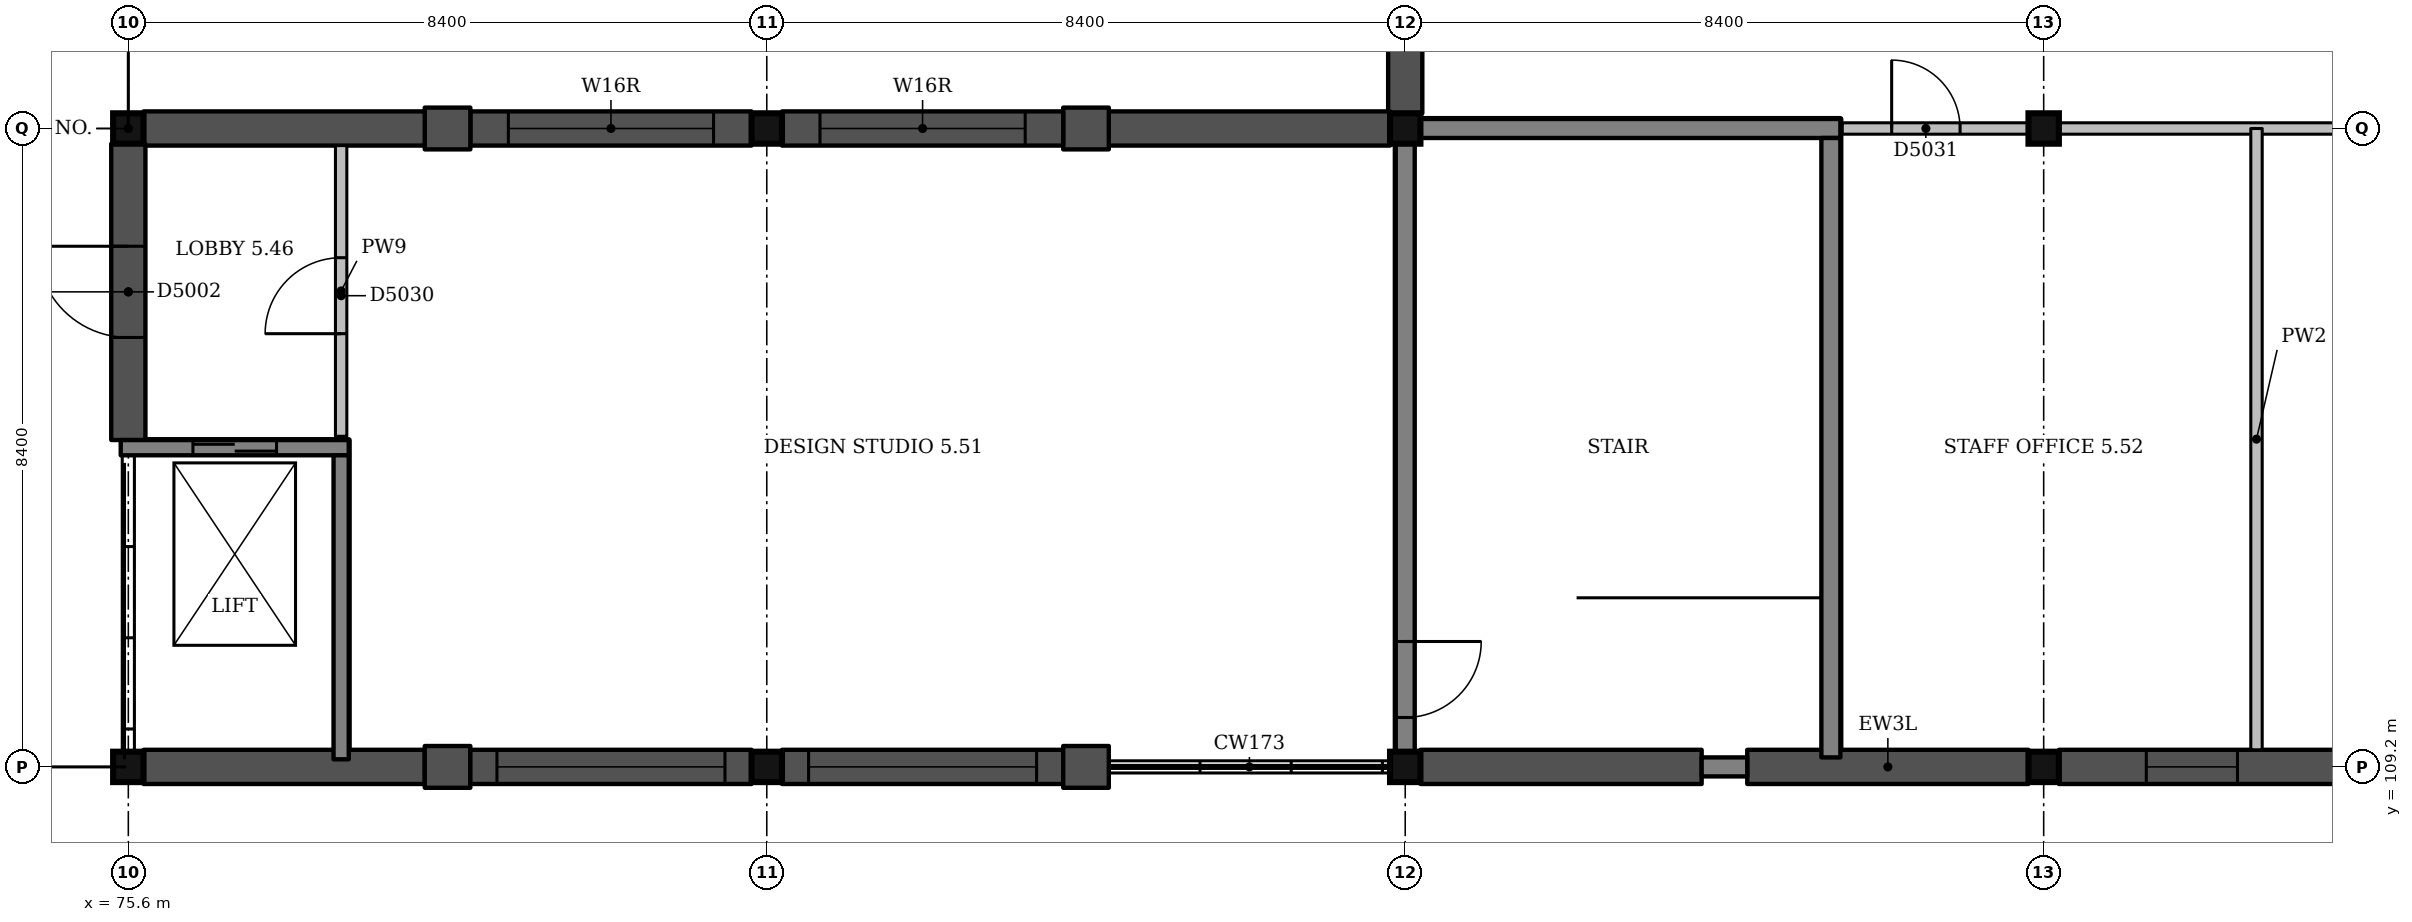
"""IFC4 building model, lengths in metres.
Left out: names, types, materials, properties, quantities, classifications, styles, units other than length and angle.
Written with IfcOpenShell. Run it as: python <this file> out.ifc"""

import sys

from ifc_helpers import new_model, si_unit, direction, frame, frame_2d, origin, origin_2d, place, context, subcontext, project, spatial, rectangle, extrude, element, fill, save


model = new_model("IFC4")
c1 = context("Model", 3, precision=1e-05, world=origin(), true_north=direction((0.0, 1.0)))
c2 = subcontext(c1, "Body", "Model", "MODEL_VIEW")
j1 = project(units=[si_unit("LENGTHUNIT", "METRE"), si_unit("PLANEANGLEUNIT", "RADIAN")], contexts=[c1])
p1 = place(None, origin())
s1 = spatial("IfcSite", under=j1, at=p1, CompositionType="ELEMENT")
p2 = place(p1, origin())
s2 = spatial("IfcBuilding", under=s1, at=p2, CompositionType="ELEMENT")
p3 = place(p2, frame((0.0, 0.0, 22.5)))
s3 = spatial("IfcBuildingStorey", under=s2, at=p3, CompositionType="ELEMENT", Elevation=22.5)
for number, where, z_axis, x_axis in (
    (1, (75.6, 109.2, 0.0), (0.0, 0.0, 1.0), (1.0, 0.0, 0.0)),
    (2, (75.6, 117.6, 0.0), (0.0, 0.0, 1.0), (1.0, 0.0, 0.0)),
    (3, (84.0, 109.2, 0.0), (0.0, 0.0, 1.0), (1.0, 0.0, 0.0)),
    (4, (84.0, 117.6, 0.0), (0.0, 0.0, 1.0), (1.0, 0.0, 0.0)),
    (5, (92.4, 109.2, 0.0), (0.0, 0.0, 1.0), (1.0, 0.0, 0.0)),
    (6, (92.4, 117.6, 0.0), (0.0, 0.0, 1.0), (1.0, 0.0, 0.0)),
    (7, (100.8, 109.2, 0.0), (0.0, 0.0, 1.0), (1.0, 0.0, 0.0)),
    (8, (100.8, 117.6, 0.0), (0.0, 0.0, 1.0), (1.0, 0.0, 0.0)),
):
    element("IfcColumn", number, at=place(p3, frame(where, z_axis=z_axis, x_axis=x_axis)), inside=s3, PredefinedType="COLUMN", context=c2, shape_type="SweptSolid", body=[
        extrude(rectangle(XDim=0.4, YDim=0.4, at=origin_2d()), origin(), (0.0, 0.0, 1.0), 4.5),
    ])
p4 = place(p3, frame((75.5, 113.4, 0.0), z_axis=(0.0, 0.0, 1.0), x_axis=(1.0, 0.0, 0.0)))
e9 = element("IfcWall", 9, at=p4, inside=s3, PredefinedType="SHEAR", context=c2, shape_type="SweptSolid", body=[
    extrude(rectangle(XDim=3.0, YDim=0.2, at=frame_2d((1.5, 0.0))), origin(), (0.0, 0.0, 1.0), 4.5),
])
p5 = place(p4, frame((0.95, 0.0, 0.0)))
e10 = element("IfcOpeningElement", 10, at=p5, cuts=e9, PredefinedType="OPENING", context=c2, shape_type="SweptSolid", body=[
    extrude(rectangle(XDim=1.1, YDim=2.1, at=frame_2d((0.55, 1.05))), frame((0.0, 0.11, 0.0), z_axis=(0.0, -1.0, 0.0), x_axis=(1.0, 0.0, 0.0)), (0.0, 0.0, 1.0), 0.22),
])
p6 = place(p3, frame((78.4, 109.3, 0.0), z_axis=(0.0, 0.0, 1.0), x_axis=(0.0, 1.0, 0.0)))
e11 = element("IfcWall", 11, at=p6, inside=s3, PredefinedType="SHEAR", context=c2, shape_type="SweptSolid", body=[
    extrude(rectangle(XDim=4.0, YDim=0.2, at=frame_2d((2.0, 0.0))), origin(), (0.0, 0.0, 1.0), 4.5),
])
p7 = place(p3, frame((92.6, 117.6, 0.0), z_axis=(0.0, 0.0, 1.0), x_axis=(1.0, 0.0, 0.0)))
e12 = element("IfcWall", 12, at=p7, inside=s3, PredefinedType="SHEAR", context=c2, shape_type="SweptSolid", body=[
    extrude(rectangle(XDim=5.525, YDim=0.25, at=frame_2d((2.762, 0.0))), origin(), (0.0, 0.0, 1.0), 4.2),
])
p8 = place(p3, frame((92.4, 109.4, 0.0), z_axis=(0.0, 0.0, 1.0), x_axis=(0.0, 1.0, 0.0)))
e13 = element("IfcWall", 13, at=p8, inside=s3, PredefinedType="SHEAR", context=c2, shape_type="SweptSolid", body=[
    extrude(rectangle(XDim=8.0, YDim=0.25, at=frame_2d((4.0, 0.0))), origin(), (0.0, 0.0, 1.0), 4.2),
])
p9 = place(p8, frame((0.45, 0.0, 0.0)))
e14 = element("IfcOpeningElement", 14, at=p9, cuts=e13, PredefinedType="OPENING", context=c2, shape_type="SweptSolid", body=[
    extrude(rectangle(XDim=1.0, YDim=2.1, at=frame_2d((0.5, 1.05))), frame((0.0, 0.135, 0.0), z_axis=(0.0, -1.0, 0.0), x_axis=(1.0, 0.0, 0.0)), (0.0, 0.0, 1.0), 0.27),
])
p10 = place(p3, frame((98.0, 109.325, 0.0), z_axis=(0.0, 0.0, 1.0), x_axis=(0.0, 1.0, 0.0)))
e15 = element("IfcWall", 15, at=p10, inside=s3, PredefinedType="SHEAR", context=c2, shape_type="SweptSolid", body=[
    extrude(rectangle(XDim=8.15, YDim=0.25, at=frame_2d((4.075, 0.0))), origin(), (0.0, 0.0, 1.0), 4.2),
])
for number, where, z_axis, x_axis in (
    (16, (92.4, 121.5, 0.0), (0.0, 0.0, 1.0), (0.0, -1.0, 0.0)),
    (17, (92.2, 117.6, 0.0), (0.0, 0.0, 1.0), (-1.0, 0.0, 0.0)),
):
    element("IfcWall", number, at=place(p3, frame(where, z_axis=z_axis, x_axis=x_axis)), inside=s3, PredefinedType="SOLIDWALL", context=c2, shape_type="SweptSolid", body=[
        extrude(rectangle(XDim=3.7, YDim=0.45, at=frame_2d((1.85, 0.0))), origin(), (0.0, 0.0, 1.0), 3.6),
    ])
p11 = place(p3, frame((88.5, 117.6, 0.0), z_axis=(0.0, 0.0, 1.0), x_axis=(-1.0, 0.0, 0.0)))
e18 = element("IfcWall", 18, at=p11, inside=s3, PredefinedType="SOLIDWALL", context=c2, shape_type="SweptSolid", body=[
    extrude(rectangle(XDim=0.6, YDim=0.55, at=frame_2d((0.3, 0.0))), origin(), (0.0, 0.0, 1.0), 3.6),
])
p12 = place(p3, frame((87.9, 117.6, 0.0), z_axis=(0.0, 0.0, 1.0), x_axis=(-1.0, 0.0, 0.0)))
e19 = element("IfcWall", 19, at=p12, inside=s3, PredefinedType="SOLIDWALL", context=c2, shape_type="SweptSolid", body=[
    extrude(rectangle(XDim=3.7, YDim=0.45, at=frame_2d((1.85, 0.0))), origin(), (0.0, 0.0, 1.0), 3.6),
])
p13 = place(p12, frame((0.5, 0.0, 0.6)))
e20 = element("IfcOpeningElement", 20, at=p13, cuts=e19, PredefinedType="OPENING", context=c2, shape_type="SweptSolid", body=[
    extrude(rectangle(XDim=2.7, YDim=2.4, at=frame_2d((1.35, 1.2))), frame((0.0, 0.235, 0.0), z_axis=(0.0, -1.0, 0.0), x_axis=(1.0, 0.0, 0.0)), (0.0, 0.0, 1.0), 0.47),
])
p14 = place(p3, frame((83.8, 117.6, 0.0), z_axis=(0.0, 0.0, 1.0), x_axis=(-1.0, 0.0, 0.0)))
e21 = element("IfcWall", 21, at=p14, inside=s3, PredefinedType="SOLIDWALL", context=c2, shape_type="SweptSolid", body=[
    extrude(rectangle(XDim=3.7, YDim=0.45, at=frame_2d((1.85, 0.0))), origin(), (0.0, 0.0, 1.0), 3.6),
])
p15 = place(p14, frame((0.5, 0.0, 0.6)))
e22 = element("IfcOpeningElement", 22, at=p15, cuts=e21, PredefinedType="OPENING", context=c2, shape_type="SweptSolid", body=[
    extrude(rectangle(XDim=2.7, YDim=2.4, at=frame_2d((1.35, 1.2))), frame((0.0, 0.235, 0.0), z_axis=(0.0, -1.0, 0.0), x_axis=(1.0, 0.0, 0.0)), (0.0, 0.0, 1.0), 0.47),
])
p16 = place(p3, frame((80.1, 117.6, 0.0), z_axis=(0.0, 0.0, 1.0), x_axis=(-1.0, 0.0, 0.0)))
e23 = element("IfcWall", 23, at=p16, inside=s3, PredefinedType="SOLIDWALL", context=c2, shape_type="SweptSolid", body=[
    extrude(rectangle(XDim=0.6, YDim=0.55, at=frame_2d((0.3, 0.0))), origin(), (0.0, 0.0, 1.0), 3.6),
])
p17 = place(p3, frame((79.5, 117.6, 0.0), z_axis=(0.0, 0.0, 1.0), x_axis=(-1.0, 0.0, 0.0)))
e24 = element("IfcWall", 24, at=p17, inside=s3, PredefinedType="SOLIDWALL", context=c2, shape_type="SweptSolid", body=[
    extrude(rectangle(XDim=3.7, YDim=0.45, at=frame_2d((1.85, 0.0))), origin(), (0.0, 0.0, 1.0), 3.6),
])
p18 = place(p3, frame((75.6, 117.4, 0.0), z_axis=(0.0, 0.0, 1.0), x_axis=(0.0, -1.0, 0.0)))
e25 = element("IfcWall", 25, at=p18, inside=s3, PredefinedType="SOLIDWALL", context=c2, shape_type="SweptSolid", body=[
    extrude(rectangle(XDim=3.899, YDim=0.45, at=frame_2d((1.949, 0.0))), origin(), (0.0, 0.0, 1.0), 3.6),
])
p19 = place(p18, frame((1.35, 0.0, 0.0)))
e26 = element("IfcOpeningElement", 26, at=p19, cuts=e25, PredefinedType="OPENING", context=c2, shape_type="SweptSolid", body=[
    extrude(rectangle(XDim=1.2, YDim=2.1, at=frame_2d((0.6, 1.05))), frame((0.0, 0.235, 0.0), z_axis=(0.0, -1.0, 0.0), x_axis=(1.0, 0.0, 0.0)), (0.0, 0.0, 1.0), 0.47),
])
p20 = place(p3, frame((75.8, 109.2, 0.0), z_axis=(0.0, 0.0, 1.0), x_axis=(1.0, 0.0, 0.0)))
e27 = element("IfcWall", 27, at=p20, inside=s3, PredefinedType="SOLIDWALL", context=c2, shape_type="SweptSolid", body=[
    extrude(rectangle(XDim=3.7, YDim=0.45, at=frame_2d((1.85, 0.0))), origin(), (0.0, 0.0, 1.0), 3.6),
])
p21 = place(p3, frame((79.5, 109.2, 0.0), z_axis=(0.0, 0.0, 1.0), x_axis=(1.0, 0.0, 0.0)))
e28 = element("IfcWall", 28, at=p21, inside=s3, PredefinedType="SOLIDWALL", context=c2, shape_type="SweptSolid", body=[
    extrude(rectangle(XDim=0.6, YDim=0.55, at=frame_2d((0.3, 0.0))), origin(), (0.0, 0.0, 1.0), 3.6),
])
p22 = place(p3, frame((80.1, 109.2, 0.0), z_axis=(0.0, 0.0, 1.0), x_axis=(1.0, 0.0, 0.0)))
e29 = element("IfcWall", 29, at=p22, inside=s3, PredefinedType="SOLIDWALL", context=c2, shape_type="SweptSolid", body=[
    extrude(rectangle(XDim=3.7, YDim=0.45, at=frame_2d((1.85, 0.0))), origin(), (0.0, 0.0, 1.0), 3.6),
])
p23 = place(p22, frame((0.35, 0.0, 0.9)))
e30 = element("IfcOpeningElement", 30, at=p23, cuts=e29, PredefinedType="OPENING", context=c2, shape_type="SweptSolid", body=[
    extrude(rectangle(XDim=3.0, YDim=2.1, at=frame_2d((1.5, 1.05))), frame((0.0, 0.235, 0.0), z_axis=(0.0, -1.0, 0.0), x_axis=(1.0, 0.0, 0.0)), (0.0, 0.0, 1.0), 0.47),
])
p24 = place(p3, frame((84.2, 109.2, 0.0), z_axis=(0.0, 0.0, 1.0), x_axis=(1.0, 0.0, 0.0)))
e31 = element("IfcWall", 31, at=p24, inside=s3, PredefinedType="SOLIDWALL", context=c2, shape_type="SweptSolid", body=[
    extrude(rectangle(XDim=3.7, YDim=0.45, at=frame_2d((1.85, 0.0))), origin(), (0.0, 0.0, 1.0), 4.2),
])
p25 = place(p24, frame((0.35, 0.0, 0.9)))
e32 = element("IfcOpeningElement", 32, at=p25, cuts=e31, PredefinedType="OPENING", context=c2, shape_type="SweptSolid", body=[
    extrude(rectangle(XDim=3.0, YDim=2.1, at=frame_2d((1.5, 1.05))), frame((0.0, 0.235, 0.0), z_axis=(0.0, -1.0, 0.0), x_axis=(1.0, 0.0, 0.0)), (0.0, 0.0, 1.0), 0.47),
])
p26 = place(p3, frame((87.9, 109.2, 0.0), z_axis=(0.0, 0.0, 1.0), x_axis=(1.0, 0.0, 0.0)))
e33 = element("IfcWall", 33, at=p26, inside=s3, PredefinedType="SOLIDWALL", context=c2, shape_type="SweptSolid", body=[
    extrude(rectangle(XDim=0.6, YDim=0.55, at=frame_2d((0.3, 0.0))), origin(), (0.0, 0.0, 1.0), 4.2),
])
p27 = place(p3, frame((92.6, 109.2, 0.0), z_axis=(0.0, 0.0, 1.0), x_axis=(1.0, 0.0, 0.0)))
e34 = element("IfcWall", 34, at=p27, inside=s3, PredefinedType="SOLIDWALL", context=c2, shape_type="SweptSolid", body=[
    extrude(rectangle(XDim=3.7, YDim=0.45, at=frame_2d((1.85, 0.0))), origin(), (0.0, 0.0, 1.0), 3.6),
])
p28 = place(p3, frame((96.9, 109.2, 0.0), z_axis=(0.0, 0.0, 1.0), x_axis=(1.0, 0.0, 0.0)))
e35 = element("IfcWall", 35, at=p28, inside=s3, PredefinedType="SOLIDWALL", context=c2, shape_type="SweptSolid", body=[
    extrude(rectangle(XDim=3.7, YDim=0.45, at=frame_2d((1.85, 0.0))), origin(), (0.0, 0.0, 1.0), 3.6),
])
p29 = place(p3, frame((101.0, 109.2, 0.0), z_axis=(0.0, 0.0, 1.0), x_axis=(1.0, 0.0, 0.0)))
e36 = element("IfcWall", 36, at=p29, inside=s3, PredefinedType="SOLIDWALL", context=c2, shape_type="SweptSolid", body=[
    extrude(rectangle(XDim=3.7, YDim=0.45, at=frame_2d((1.85, 0.0))), origin(), (0.0, 0.0, 1.0), 3.6),
])
p30 = place(p29, frame((1.15, 0.0, 0.9)))
e37 = element("IfcOpeningElement", 37, at=p30, cuts=e36, PredefinedType="OPENING", context=c2, shape_type="SweptSolid", body=[
    extrude(rectangle(XDim=1.2, YDim=2.1, at=frame_2d((0.6, 1.05))), frame((0.0, 0.235, 0.0), z_axis=(0.0, -1.0, 0.0), x_axis=(1.0, 0.0, 0.0)), (0.0, 0.0, 1.0), 0.47),
])
p31 = place(p3, frame((98.15, 117.6, 0.0), z_axis=(0.0, 0.0, 1.0), x_axis=(1.0, 0.0, 0.0)))
e38 = element("IfcWall", 38, at=p31, inside=s3, PredefinedType="PARTITIONING", context=c2, shape_type="SweptSolid", body=[
    extrude(rectangle(XDim=2.45, YDim=0.15, at=frame_2d((1.225, 0.0))), origin(), (0.0, 0.0, 1.0), 3.6),
])
p32 = place(p31, frame((0.65, 0.0, 0.0)))
e39 = element("IfcOpeningElement", 39, at=p32, cuts=e38, PredefinedType="OPENING", context=c2, shape_type="SweptSolid", body=[
    extrude(rectangle(XDim=0.9, YDim=2.1, at=frame_2d((0.45, 1.05))), frame((0.0, 0.085, 0.0), z_axis=(0.0, -1.0, 0.0), x_axis=(1.0, 0.0, 0.0)), (0.0, 0.0, 1.0), 0.17),
])
p33 = place(p3, frame((101.0, 117.6, 0.0), z_axis=(0.0, 0.0, 1.0), x_axis=(1.0, 0.0, 0.0)))
e40 = element("IfcWall", 40, at=p33, inside=s3, PredefinedType="PARTITIONING", context=c2, shape_type="SweptSolid", body=[
    extrude(rectangle(XDim=8.0, YDim=0.15, at=frame_2d((4.0, 0.0))), origin(), (0.0, 0.0, 1.0), 3.6),
])
p34 = place(p33, frame((5.0, 0.0, 0.0)))
e41 = element("IfcOpeningElement", 41, at=p34, cuts=e40, PredefinedType="OPENING", context=c2, shape_type="SweptSolid", body=[
    extrude(rectangle(XDim=0.9, YDim=2.1, at=frame_2d((0.45, 1.05))), frame((0.0, 0.085, 0.0), z_axis=(0.0, -1.0, 0.0), x_axis=(1.0, 0.0, 0.0)), (0.0, 0.0, 1.0), 0.17),
])
p35 = place(p3, frame((78.4, 113.55, 0.0), z_axis=(0.0, 0.0, 1.0), x_axis=(0.0, 1.0, 0.0)))
e42 = element("IfcWall", 42, at=p35, inside=s3, PredefinedType="PARTITIONING", context=c2, shape_type="SweptSolid", body=[
    extrude(rectangle(XDim=3.825, YDim=0.15, at=frame_2d((1.913, 0.0))), origin(), (0.0, 0.0, 1.0), 4.15),
])
p36 = place(p35, frame((1.35, 0.0, 0.0)))
e43 = element("IfcOpeningElement", 43, at=p36, cuts=e42, PredefinedType="OPENING", context=c2, shape_type="SweptSolid", body=[
    extrude(rectangle(XDim=1.0, YDim=2.1, at=frame_2d((0.5, 1.05))), frame((0.0, 0.085, 0.0), z_axis=(0.0, -1.0, 0.0), x_axis=(1.0, 0.0, 0.0)), (0.0, 0.0, 1.0), 0.17),
])
p37 = place(p3, frame((103.6, 109.425, 0.0), z_axis=(0.0, 0.0, 1.0), x_axis=(0.0, 1.0, 0.0)))
e44 = element("IfcWall", 44, at=p37, inside=s3, PredefinedType="PARTITIONING", context=c2, shape_type="SweptSolid", body=[
    extrude(rectangle(XDim=8.175, YDim=0.15, at=frame_2d((4.087, 0.0))), origin(), (0.0, 0.0, 1.0), 3.6),
])
p38 = place(p3, frame((96.3, 109.2, 0.0), z_axis=(0.0, 0.0, 1.0), x_axis=(1.0, 0.0, 0.0)))
e45 = element("IfcWall", 45, at=p38, inside=s3, PredefinedType="SHEAR", context=c2, shape_type="SweptSolid", body=[
    extrude(rectangle(XDim=0.6, YDim=0.25, at=frame_2d((0.3, 0.0))), origin(), (0.0, 0.0, 1.0), 4.2),
])
p39 = place(p13, origin())
e46 = element("IfcWindow", 46, at=p39, inside=s3, PartitioningType="SINGLE_PANEL", PredefinedType="WINDOW", context=c2, shape_type="SweptSolid", body=[
    extrude(rectangle(XDim=2.7, YDim=2.4, at=frame_2d((1.35, 1.2))), frame((0.0, 0.135, 0.0), z_axis=(0.0, -1.0, 0.0), x_axis=(1.0, 0.0, 0.0)), (0.0, 0.0, 1.0), 0.06),
])
fill(e20, e46)
p40 = place(p15, origin())
e47 = element("IfcWindow", 47, at=p40, inside=s3, PartitioningType="SINGLE_PANEL", PredefinedType="WINDOW", context=c2, shape_type="SweptSolid", body=[
    extrude(rectangle(XDim=2.7, YDim=2.4, at=frame_2d((1.35, 1.2))), frame((0.0, 0.135, 0.0), z_axis=(0.0, -1.0, 0.0), x_axis=(1.0, 0.0, 0.0)), (0.0, 0.0, 1.0), 0.06),
])
fill(e22, e47)
p41 = place(p19, origin())
e48 = element("IfcDoor", 48, at=p41, inside=s3, OperationType="SINGLE_SWING_LEFT", PredefinedType="DOOR", context=c2, shape_type="SweptSolid", body=[
    extrude(rectangle(XDim=1.2, YDim=2.1, at=frame_2d((0.6, 1.05))), frame((0.0, 0.025, 0.0), z_axis=(0.0, -1.0, 0.0), x_axis=(1.0, 0.0, 0.0)), (0.0, 0.0, 1.0), 0.05),
])
fill(e26, e48)
p42 = place(p23, origin())
e49 = element("IfcWindow", 49, at=p42, inside=s3, PartitioningType="SINGLE_PANEL", PredefinedType="WINDOW", context=c2, shape_type="SweptSolid", body=[
    extrude(rectangle(XDim=3.0, YDim=2.1, at=frame_2d((1.5, 1.05))), frame((0.0, 0.135, 0.0), z_axis=(0.0, -1.0, 0.0), x_axis=(1.0, 0.0, 0.0)), (0.0, 0.0, 1.0), 0.06),
])
fill(e30, e49)
p43 = place(p25, origin())
e50 = element("IfcWindow", 50, at=p43, inside=s3, PartitioningType="SINGLE_PANEL", PredefinedType="WINDOW", context=c2, shape_type="SweptSolid", body=[
    extrude(rectangle(XDim=3.0, YDim=2.1, at=frame_2d((1.5, 1.05))), frame((0.0, 0.135, 0.0), z_axis=(0.0, -1.0, 0.0), x_axis=(1.0, 0.0, 0.0)), (0.0, 0.0, 1.0), 0.06),
])
fill(e32, e50)
p44 = place(p30, origin())
e51 = element("IfcWindow", 51, at=p44, inside=s3, PartitioningType="SINGLE_PANEL", PredefinedType="WINDOW", context=c2, shape_type="SweptSolid", body=[
    extrude(rectangle(XDim=1.2, YDim=2.1, at=frame_2d((0.6, 1.05))), frame((0.0, 0.135, 0.0), z_axis=(0.0, -1.0, 0.0), x_axis=(1.0, 0.0, 0.0)), (0.0, 0.0, 1.0), 0.06),
])
fill(e37, e51)
p45 = place(p36, origin())
e52 = element("IfcDoor", 52, at=p45, inside=s3, OperationType="SINGLE_SWING_LEFT", PredefinedType="DOOR", context=c2, shape_type="SweptSolid", body=[
    extrude(rectangle(XDim=1.0, YDim=2.1, at=frame_2d((0.5, 1.05))), frame((0.0, 0.025, 0.0), z_axis=(0.0, -1.0, 0.0), x_axis=(1.0, 0.0, 0.0)), (0.0, 0.0, 1.0), 0.05),
])
fill(e43, e52)
p46 = place(p32, origin())
e53 = element("IfcDoor", 53, at=p46, inside=s3, OperationType="SINGLE_SWING_LEFT", PredefinedType="DOOR", context=c2, shape_type="SweptSolid", body=[
    extrude(rectangle(XDim=0.9, YDim=2.1, at=frame_2d((0.45, 1.05))), frame((0.0, 0.025, 0.0), z_axis=(0.0, -1.0, 0.0), x_axis=(1.0, 0.0, 0.0)), (0.0, 0.0, 1.0), 0.05),
])
fill(e39, e53)
p47 = place(p9, origin())
e54 = element("IfcDoor", 54, at=p47, inside=s3, OperationType="SINGLE_SWING_RIGHT", PredefinedType="DOOR", context=c2, shape_type="SweptSolid", body=[
    extrude(rectangle(XDim=1.0, YDim=2.1, at=frame_2d((0.5, 1.05))), frame((0.0, 0.025, 0.0), z_axis=(0.0, -1.0, 0.0), x_axis=(1.0, 0.0, 0.0)), (0.0, 0.0, 1.0), 0.05),
])
fill(e14, e54)
p48 = place(p5, origin())
e55 = element("IfcDoor", 55, at=p48, inside=s3, OperationType="SLIDING_TO_RIGHT", PredefinedType="DOOR", context=c2, shape_type="SweptSolid", body=[
    extrude(rectangle(XDim=1.1, YDim=2.1, at=frame_2d((0.55, 1.05))), frame((0.0, 0.025, 0.0), z_axis=(0.0, -1.0, 0.0), x_axis=(1.0, 0.0, 0.0)), (0.0, 0.0, 1.0), 0.05),
])
fill(e10, e55)
save(model, sys.argv[1])
